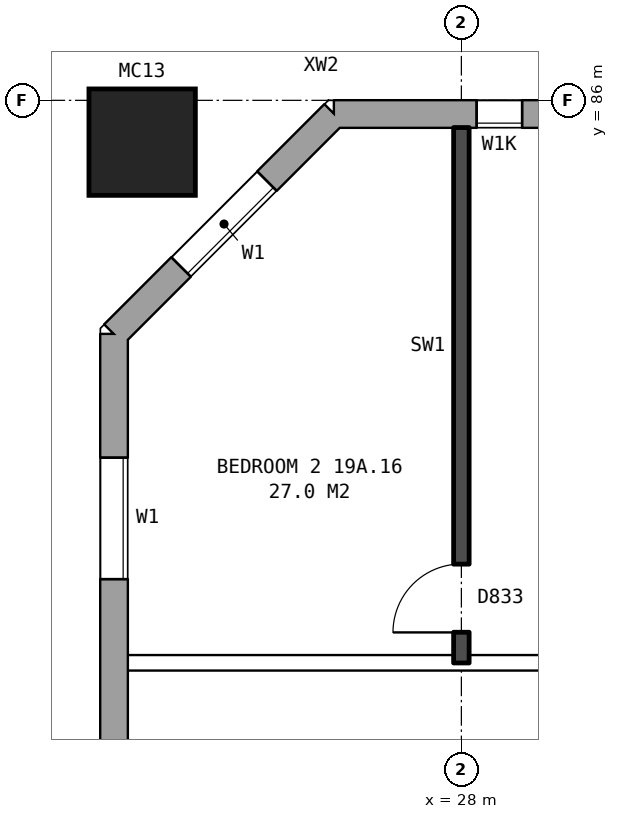
"""IFC4 building model, lengths in metres.
Left out: names, types, materials, properties, quantities, classifications, styles, units other than length and angle.
Written with IfcOpenShell. Run it as: python <this file> out.ifc"""

import sys

from ifc_helpers import new_model, si_unit, direction, frame, frame_2d, origin, origin_2d, place, context, subcontext, project, spatial, rectangle, hollow_rectangle, extrude, element, fill, save


model = new_model("IFC4")
c1 = context("Model", 3, precision=1e-05, world=origin(), true_north=direction((0.0, 1.0)))
c2 = subcontext(c1, "Body", "Model", "MODEL_VIEW")
j1 = project(units=[si_unit("LENGTHUNIT", "METRE"), si_unit("PLANEANGLEUNIT", "RADIAN")], contexts=[c1])
p1 = place(None, origin())
s1 = spatial("IfcSite", under=j1, at=p1, CompositionType="ELEMENT")
p2 = place(p1, origin())
s2 = spatial("IfcBuilding", under=s1, at=p2, CompositionType="ELEMENT")
p3 = place(p2, frame((0.0, 0.0, 71.6)))
s3 = spatial("IfcBuildingStorey", under=s2, at=p3, CompositionType="ELEMENT", Elevation=71.6)
p4 = place(p3, frame((23.8, 85.45, 0.0), z_axis=(0.0, 0.0, 1.0), x_axis=(1.0, 0.0, 0.0)))
e1 = element("IfcColumn", 1, at=p4, inside=s3, PredefinedType="COLUMN", context=c2, shape_type="SweptSolid", body=[
    extrude(hollow_rectangle(XDim=1.4, YDim=1.4, WallThickness=0.075, at=origin_2d()), origin(), (0.0, 0.0, 1.0), 3.1),
])
p5 = place(p3, frame((72.925, 85.82, 0.0), z_axis=(0.0, 0.0, 1.0), x_axis=(-1.0, 0.0, 0.0)))
e2 = element("IfcWall", 2, at=p5, inside=s3, PredefinedType="STANDARD", context=c2, shape_type="SweptSolid", body=[
    extrude(rectangle(XDim=46.601, YDim=0.36, at=frame_2d((23.3, 0.0))), origin(), (0.0, 0.0, 1.0), 2.85),
])
p6 = place(p5, frame((0.625, 0.0, 0.8)))
e3 = element("IfcOpeningElement", 3, at=p6, cuts=e2, PredefinedType="OPENING", context=c2, shape_type="SweptSolid", body=[
    extrude(rectangle(XDim=1.6, YDim=1.8, at=frame_2d((0.8, 0.9))), frame((0.0, 0.19, 0.0), z_axis=(0.0, -1.0, 0.0), x_axis=(1.0, 0.0, 0.0)), (0.0, 0.0, 1.0), 0.38),
])
p7 = place(p5, frame((4.625, 0.0, 0.8)))
e4 = element("IfcOpeningElement", 4, at=p7, cuts=e2, PredefinedType="OPENING", context=c2, shape_type="SweptSolid", body=[
    extrude(rectangle(XDim=0.8, YDim=0.9, at=frame_2d((0.4, 0.45))), frame((0.0, 0.19, 0.0), z_axis=(0.0, -1.0, 0.0), x_axis=(1.0, 0.0, 0.0)), (0.0, 0.0, 1.0), 0.38),
])
p8 = place(p5, frame((6.625, 0.0, 0.8)))
e5 = element("IfcOpeningElement", 5, at=p8, cuts=e2, PredefinedType="OPENING", context=c2, shape_type="SweptSolid", body=[
    extrude(rectangle(XDim=1.6, YDim=1.8, at=frame_2d((0.8, 0.9))), frame((0.0, 0.19, 0.0), z_axis=(0.0, -1.0, 0.0), x_axis=(1.0, 0.0, 0.0)), (0.0, 0.0, 1.0), 0.38),
])
p9 = place(p5, frame((9.625, 0.0, 0.8)))
e6 = element("IfcOpeningElement", 6, at=p9, cuts=e2, PredefinedType="OPENING", context=c2, shape_type="SweptSolid", body=[
    extrude(rectangle(XDim=1.6, YDim=1.8, at=frame_2d((0.8, 0.9))), frame((0.0, 0.19, 0.0), z_axis=(0.0, -1.0, 0.0), x_axis=(1.0, 0.0, 0.0)), (0.0, 0.0, 1.0), 0.38),
])
p10 = place(p5, frame((12.625, 0.0, 0.8)))
e7 = element("IfcOpeningElement", 7, at=p10, cuts=e2, PredefinedType="OPENING", context=c2, shape_type="SweptSolid", body=[
    extrude(rectangle(XDim=1.6, YDim=1.8, at=frame_2d((0.8, 0.9))), frame((0.0, 0.19, 0.0), z_axis=(0.0, -1.0, 0.0), x_axis=(1.0, 0.0, 0.0)), (0.0, 0.0, 1.0), 0.38),
])
p11 = place(p5, frame((15.625, 0.0, 0.8)))
e8 = element("IfcOpeningElement", 8, at=p11, cuts=e2, PredefinedType="OPENING", context=c2, shape_type="SweptSolid", body=[
    extrude(rectangle(XDim=1.6, YDim=1.8, at=frame_2d((0.8, 0.9))), frame((0.0, 0.19, 0.0), z_axis=(0.0, -1.0, 0.0), x_axis=(1.0, 0.0, 0.0)), (0.0, 0.0, 1.0), 0.38),
])
p12 = place(p5, frame((18.625, 0.0, 0.8)))
e9 = element("IfcOpeningElement", 9, at=p12, cuts=e2, PredefinedType="OPENING", context=c2, shape_type="SweptSolid", body=[
    extrude(rectangle(XDim=1.6, YDim=1.8, at=frame_2d((0.8, 0.9))), frame((0.0, 0.19, 0.0), z_axis=(0.0, -1.0, 0.0), x_axis=(1.0, 0.0, 0.0)), (0.0, 0.0, 1.0), 0.38),
])
p13 = place(p5, frame((21.625, 0.0, 0.8)))
e10 = element("IfcOpeningElement", 10, at=p13, cuts=e2, PredefinedType="OPENING", context=c2, shape_type="SweptSolid", body=[
    extrude(rectangle(XDim=1.6, YDim=1.8, at=frame_2d((0.8, 0.9))), frame((0.0, 0.19, 0.0), z_axis=(0.0, -1.0, 0.0), x_axis=(1.0, 0.0, 0.0)), (0.0, 0.0, 1.0), 0.38),
])
p14 = place(p5, frame((24.625, 0.0, 0.8)))
e11 = element("IfcOpeningElement", 11, at=p14, cuts=e2, PredefinedType="OPENING", context=c2, shape_type="SweptSolid", body=[
    extrude(rectangle(XDim=1.6, YDim=1.8, at=frame_2d((0.8, 0.9))), frame((0.0, 0.19, 0.0), z_axis=(0.0, -1.0, 0.0), x_axis=(1.0, 0.0, 0.0)), (0.0, 0.0, 1.0), 0.38),
])
p15 = place(p5, frame((27.625, 0.0, 0.8)))
e12 = element("IfcOpeningElement", 12, at=p15, cuts=e2, PredefinedType="OPENING", context=c2, shape_type="SweptSolid", body=[
    extrude(rectangle(XDim=1.6, YDim=1.8, at=frame_2d((0.8, 0.9))), frame((0.0, 0.19, 0.0), z_axis=(0.0, -1.0, 0.0), x_axis=(1.0, 0.0, 0.0)), (0.0, 0.0, 1.0), 0.38),
])
p16 = place(p5, frame((30.625, 0.0, 0.8)))
e13 = element("IfcOpeningElement", 13, at=p16, cuts=e2, PredefinedType="OPENING", context=c2, shape_type="SweptSolid", body=[
    extrude(rectangle(XDim=1.6, YDim=1.8, at=frame_2d((0.8, 0.9))), frame((0.0, 0.19, 0.0), z_axis=(0.0, -1.0, 0.0), x_axis=(1.0, 0.0, 0.0)), (0.0, 0.0, 1.0), 0.38),
])
p17 = place(p5, frame((33.625, 0.0, 0.8)))
e14 = element("IfcOpeningElement", 14, at=p17, cuts=e2, PredefinedType="OPENING", context=c2, shape_type="SweptSolid", body=[
    extrude(rectangle(XDim=1.6, YDim=1.8, at=frame_2d((0.8, 0.9))), frame((0.0, 0.19, 0.0), z_axis=(0.0, -1.0, 0.0), x_axis=(1.0, 0.0, 0.0)), (0.0, 0.0, 1.0), 0.38),
])
p18 = place(p5, frame((36.625, 0.0, 0.8)))
e15 = element("IfcOpeningElement", 15, at=p18, cuts=e2, PredefinedType="OPENING", context=c2, shape_type="SweptSolid", body=[
    extrude(rectangle(XDim=1.6, YDim=1.8, at=frame_2d((0.8, 0.9))), frame((0.0, 0.19, 0.0), z_axis=(0.0, -1.0, 0.0), x_axis=(1.0, 0.0, 0.0)), (0.0, 0.0, 1.0), 0.38),
])
p19 = place(p5, frame((39.625, 0.0, 0.8)))
e16 = element("IfcOpeningElement", 16, at=p19, cuts=e2, PredefinedType="OPENING", context=c2, shape_type="SweptSolid", body=[
    extrude(rectangle(XDim=1.6, YDim=1.8, at=frame_2d((0.8, 0.9))), frame((0.0, 0.19, 0.0), z_axis=(0.0, -1.0, 0.0), x_axis=(1.0, 0.0, 0.0)), (0.0, 0.0, 1.0), 0.38),
])
p20 = place(p5, frame((43.225, 0.0, 1.7)))
e17 = element("IfcOpeningElement", 17, at=p20, cuts=e2, PredefinedType="OPENING", context=c2, shape_type="SweptSolid", body=[
    extrude(rectangle(XDim=0.6, YDim=0.9, at=frame_2d((0.3, 0.45))), frame((0.0, 0.19, 0.0), z_axis=(0.0, -1.0, 0.0), x_axis=(1.0, 0.0, 0.0)), (0.0, 0.0, 1.0), 0.38),
])
p21 = place(p5, frame((5.725, 0.0, 0.8)))
e18 = element("IfcOpeningElement", 18, at=p21, cuts=e2, PredefinedType="OPENING", context=c2, shape_type="SweptSolid", body=[
    extrude(rectangle(XDim=0.6, YDim=1.8, at=frame_2d((0.3, 0.9))), frame((0.0, 0.19, 0.0), z_axis=(0.0, -1.0, 0.0), x_axis=(1.0, 0.0, 0.0)), (0.0, 0.0, 1.0), 0.38),
])
p22 = place(p5, frame((44.125, 0.0, 1.0)))
e19 = element("IfcOpeningElement", 19, at=p22, cuts=e2, PredefinedType="OPENING", context=c2, shape_type="SweptSolid", body=[
    extrude(rectangle(XDim=0.6, YDim=1.5, at=frame_2d((0.3, 0.75))), frame((0.0, 0.19, 0.0), z_axis=(0.0, -1.0, 0.0), x_axis=(1.0, 0.0, 0.0)), (0.0, 0.0, 1.0), 0.38),
])
p23 = place(p3, frame((26.325, 85.82, 0.0), z_axis=(0.0, 0.0, 1.0), x_axis=(-0.707106781187, -0.707106781187, 0.0)))
e20 = element("IfcWall", 20, at=p23, inside=s3, PredefinedType="STANDARD", context=c2, shape_type="SweptSolid", body=[
    extrude(rectangle(XDim=4.094, YDim=0.36, at=frame_2d((2.047, 0.0))), origin(), (0.0, 0.0, 1.0), 2.85),
])
p24 = place(p23, frame((1.247, 0.0, 0.8)))
e21 = element("IfcOpeningElement", 21, at=p24, cuts=e20, PredefinedType="OPENING", context=c2, shape_type="SweptSolid", body=[
    extrude(rectangle(XDim=1.6, YDim=1.8, at=frame_2d((0.8, 0.9))), frame((0.0, 0.19, 0.0), z_axis=(0.0, -1.0, 0.0), x_axis=(1.0, 0.0, 0.0)), (0.0, 0.0, 1.0), 0.38),
])
p25 = place(p3, frame((23.43, 82.925, 0.0), z_axis=(0.0, 0.0, 1.0), x_axis=(0.0, -1.0, 0.0)))
e22 = element("IfcWall", 22, at=p25, inside=s3, PredefinedType="STANDARD", context=c2, shape_type="SweptSolid", body=[
    extrude(rectangle(XDim=25.851, YDim=0.36, at=frame_2d((12.925, 0.0))), origin(), (0.0, 0.0, 1.0), 2.85),
])
p26 = place(p25, frame((1.625, 0.0, 0.8)))
e23 = element("IfcOpeningElement", 23, at=p26, cuts=e22, PredefinedType="OPENING", context=c2, shape_type="SweptSolid", body=[
    extrude(rectangle(XDim=1.6, YDim=1.8, at=frame_2d((0.8, 0.9))), frame((0.0, 0.19, 0.0), z_axis=(0.0, -1.0, 0.0), x_axis=(1.0, 0.0, 0.0)), (0.0, 0.0, 1.0), 0.38),
])
p27 = place(p25, frame((5.775, 0.0, 0.8)))
e24 = element("IfcOpeningElement", 24, at=p27, cuts=e22, PredefinedType="OPENING", context=c2, shape_type="SweptSolid", body=[
    extrude(rectangle(XDim=0.6, YDim=0.9, at=frame_2d((0.3, 0.45))), frame((0.0, 0.19, 0.0), z_axis=(0.0, -1.0, 0.0), x_axis=(1.0, 0.0, 0.0)), (0.0, 0.0, 1.0), 0.38),
])
p28 = place(p25, frame((7.625, 0.0, 0.8)))
e25 = element("IfcOpeningElement", 25, at=p28, cuts=e22, PredefinedType="OPENING", context=c2, shape_type="SweptSolid", body=[
    extrude(rectangle(XDim=1.6, YDim=1.8, at=frame_2d((0.8, 0.9))), frame((0.0, 0.19, 0.0), z_axis=(0.0, -1.0, 0.0), x_axis=(1.0, 0.0, 0.0)), (0.0, 0.0, 1.0), 0.38),
])
p29 = place(p25, frame((10.625, 0.0, 0.8)))
e26 = element("IfcOpeningElement", 26, at=p29, cuts=e22, PredefinedType="OPENING", context=c2, shape_type="SweptSolid", body=[
    extrude(rectangle(XDim=1.6, YDim=1.8, at=frame_2d((0.8, 0.9))), frame((0.0, 0.19, 0.0), z_axis=(0.0, -1.0, 0.0), x_axis=(1.0, 0.0, 0.0)), (0.0, 0.0, 1.0), 0.38),
])
p30 = place(p25, frame((13.625, 0.0, 0.8)))
e27 = element("IfcOpeningElement", 27, at=p30, cuts=e22, PredefinedType="OPENING", context=c2, shape_type="SweptSolid", body=[
    extrude(rectangle(XDim=1.6, YDim=1.8, at=frame_2d((0.8, 0.9))), frame((0.0, 0.19, 0.0), z_axis=(0.0, -1.0, 0.0), x_axis=(1.0, 0.0, 0.0)), (0.0, 0.0, 1.0), 0.38),
])
p31 = place(p25, frame((16.625, 0.0, 0.8)))
e28 = element("IfcOpeningElement", 28, at=p31, cuts=e22, PredefinedType="OPENING", context=c2, shape_type="SweptSolid", body=[
    extrude(rectangle(XDim=1.6, YDim=1.8, at=frame_2d((0.8, 0.9))), frame((0.0, 0.19, 0.0), z_axis=(0.0, -1.0, 0.0), x_axis=(1.0, 0.0, 0.0)), (0.0, 0.0, 1.0), 0.38),
])
p32 = place(p25, frame((6.675, 0.0, 0.8)))
e29 = element("IfcOpeningElement", 29, at=p32, cuts=e22, PredefinedType="OPENING", context=c2, shape_type="SweptSolid", body=[
    extrude(rectangle(XDim=0.6, YDim=1.5, at=frame_2d((0.3, 0.75))), frame((0.0, 0.19, 0.0), z_axis=(0.0, -1.0, 0.0), x_axis=(1.0, 0.0, 0.0)), (0.0, 0.0, 1.0), 0.38),
])
p33 = place(p25, frame((22.625, 0.0, 0.8)))
e30 = element("IfcOpeningElement", 30, at=p33, cuts=e22, PredefinedType="OPENING", context=c2, shape_type="SweptSolid", body=[
    extrude(rectangle(XDim=1.6, YDim=1.8, at=frame_2d((0.8, 0.9))), frame((0.0, 0.19, 0.0), z_axis=(0.0, -1.0, 0.0), x_axis=(1.0, 0.0, 0.0)), (0.0, 0.0, 1.0), 0.38),
])
p34 = place(p25, frame((9.525, 0.0, 0.8)))
e31 = element("IfcOpeningElement", 31, at=p34, cuts=e22, PredefinedType="OPENING", context=c2, shape_type="SweptSolid", body=[
    extrude(rectangle(XDim=0.8, YDim=1.8, at=frame_2d((0.4, 0.9))), frame((0.0, 0.19, 0.0), z_axis=(0.0, -1.0, 0.0), x_axis=(1.0, 0.0, 0.0)), (0.0, 0.0, 1.0), 0.38),
])
p35 = place(p25, frame((12.525, 0.0, 0.8)))
e32 = element("IfcOpeningElement", 32, at=p35, cuts=e22, PredefinedType="OPENING", context=c2, shape_type="SweptSolid", body=[
    extrude(rectangle(XDim=0.8, YDim=1.8, at=frame_2d((0.4, 0.9))), frame((0.0, 0.19, 0.0), z_axis=(0.0, -1.0, 0.0), x_axis=(1.0, 0.0, 0.0)), (0.0, 0.0, 1.0), 0.38),
])
p36 = place(p25, frame((15.525, 0.0, 0.8)))
e33 = element("IfcOpeningElement", 33, at=p36, cuts=e22, PredefinedType="OPENING", context=c2, shape_type="SweptSolid", body=[
    extrude(rectangle(XDim=0.8, YDim=1.8, at=frame_2d((0.4, 0.9))), frame((0.0, 0.19, 0.0), z_axis=(0.0, -1.0, 0.0), x_axis=(1.0, 0.0, 0.0)), (0.0, 0.0, 1.0), 0.38),
])
p37 = place(p25, frame((18.525, 0.0, 0.8)))
e34 = element("IfcOpeningElement", 34, at=p37, cuts=e22, PredefinedType="OPENING", context=c2, shape_type="SweptSolid", body=[
    extrude(rectangle(XDim=0.6, YDim=1.5, at=frame_2d((0.3, 0.75))), frame((0.0, 0.19, 0.0), z_axis=(0.0, -1.0, 0.0), x_axis=(1.0, 0.0, 0.0)), (0.0, 0.0, 1.0), 0.38),
])
p38 = place(p25, frame((19.425, 0.0, 0.8)))
e35 = element("IfcOpeningElement", 35, at=p38, cuts=e22, PredefinedType="OPENING", context=c2, shape_type="SweptSolid", body=[
    extrude(rectangle(XDim=0.6, YDim=0.9, at=frame_2d((0.3, 0.45))), frame((0.0, 0.19, 0.0), z_axis=(0.0, -1.0, 0.0), x_axis=(1.0, 0.0, 0.0)), (0.0, 0.0, 1.0), 0.38),
])
p39 = place(p3, frame((23.61, 78.6, 0.0), z_axis=(0.0, 0.0, 1.0), x_axis=(1.0, 0.0, 0.0)))
e36 = element("IfcWall", 36, at=p39, inside=s3, PredefinedType="PARTITIONING", context=c2, shape_type="SweptSolid", body=[
    extrude(rectangle(XDim=22.29, YDim=0.2, at=frame_2d((11.145, 0.0))), origin(), (0.0, 0.0, 1.0), 2.85),
])
p40 = place(p39, frame((18.84, 0.0, 0.0)))
e37 = element("IfcOpeningElement", 37, at=p40, cuts=e36, PredefinedType="OPENING", context=c2, shape_type="SweptSolid", body=[
    extrude(rectangle(XDim=1.0, YDim=2.1, at=frame_2d((0.5, 1.05))), frame((0.0, 0.11, 0.0), z_axis=(0.0, -1.0, 0.0), x_axis=(1.0, 0.0, 0.0)), (0.0, 0.0, 1.0), 0.22),
])
p41 = place(p39, frame((6.89, 0.0, 0.0)))
e38 = element("IfcOpeningElement", 38, at=p41, cuts=e36, PredefinedType="OPENING", context=c2, shape_type="SweptSolid", body=[
    extrude(rectangle(XDim=1.0, YDim=2.1, at=frame_2d((0.5, 1.05))), frame((0.0, 0.11, 0.0), z_axis=(0.0, -1.0, 0.0), x_axis=(1.0, 0.0, 0.0)), (0.0, 0.0, 1.0), 0.22),
])
p42 = place(p3, frame((28.0, 78.6, 0.0), z_axis=(0.0, 0.0, 1.0), x_axis=(0.0, 1.0, 0.0)))
e39 = element("IfcWall", 39, at=p42, inside=s3, PredefinedType="SOLIDWALL", context=c2, shape_type="SweptSolid", body=[
    extrude(rectangle(XDim=7.04, YDim=0.2, at=frame_2d((3.52, 0.0))), origin(), (0.0, 0.0, 1.0), 2.85),
])
p43 = place(p42, frame((0.4, 0.0, 0.0)))
e40 = element("IfcOpeningElement", 40, at=p43, cuts=e39, PredefinedType="OPENING", context=c2, shape_type="SweptSolid", body=[
    extrude(rectangle(XDim=0.9, YDim=2.1, at=frame_2d((0.45, 1.05))), frame((0.0, 0.11, 0.0), z_axis=(0.0, -1.0, 0.0), x_axis=(1.0, 0.0, 0.0)), (0.0, 0.0, 1.0), 0.22),
])
p44 = place(p24, origin())
e41 = element("IfcWindow", 41, at=p44, inside=s3, PartitioningType="SINGLE_PANEL", PredefinedType="WINDOW", context=c2, shape_type="SweptSolid", body=[
    extrude(rectangle(XDim=1.6, YDim=1.8, at=frame_2d((0.8, 0.9))), frame((0.0, 0.15, 0.0), z_axis=(0.0, -1.0, 0.0), x_axis=(1.0, 0.0, 0.0)), (0.0, 0.0, 1.0), 0.06),
])
fill(e21, e41)
p45 = place(p26, origin())
e42 = element("IfcWindow", 42, at=p45, inside=s3, PartitioningType="SINGLE_PANEL", PredefinedType="WINDOW", context=c2, shape_type="SweptSolid", body=[
    extrude(rectangle(XDim=1.6, YDim=1.8, at=frame_2d((0.8, 0.9))), frame((0.0, 0.15, 0.0), z_axis=(0.0, -1.0, 0.0), x_axis=(1.0, 0.0, 0.0)), (0.0, 0.0, 1.0), 0.06),
])
fill(e23, e42)
p46 = place(p43, origin())
e43 = element("IfcDoor", 43, at=p46, inside=s3, OperationType="SINGLE_SWING_LEFT", PredefinedType="DOOR", context=c2, shape_type="SweptSolid", body=[
    extrude(rectangle(XDim=0.9, YDim=2.1, at=frame_2d((0.45, 1.05))), frame((0.0, 0.025, 0.0), z_axis=(0.0, -1.0, 0.0), x_axis=(1.0, 0.0, 0.0)), (0.0, 0.0, 1.0), 0.05),
])
fill(e40, e43)
p47 = place(p22, origin())
e44 = element("IfcWindow", 44, at=p47, inside=s3, PartitioningType="SINGLE_PANEL", PredefinedType="WINDOW", context=c2, shape_type="SweptSolid", body=[
    extrude(rectangle(XDim=0.6, YDim=1.5, at=frame_2d((0.3, 0.75))), frame((0.0, 0.15, 0.0), z_axis=(0.0, -1.0, 0.0), x_axis=(1.0, 0.0, 0.0)), (0.0, 0.0, 1.0), 0.06),
])
fill(e19, e44)
save(model, sys.argv[1])
